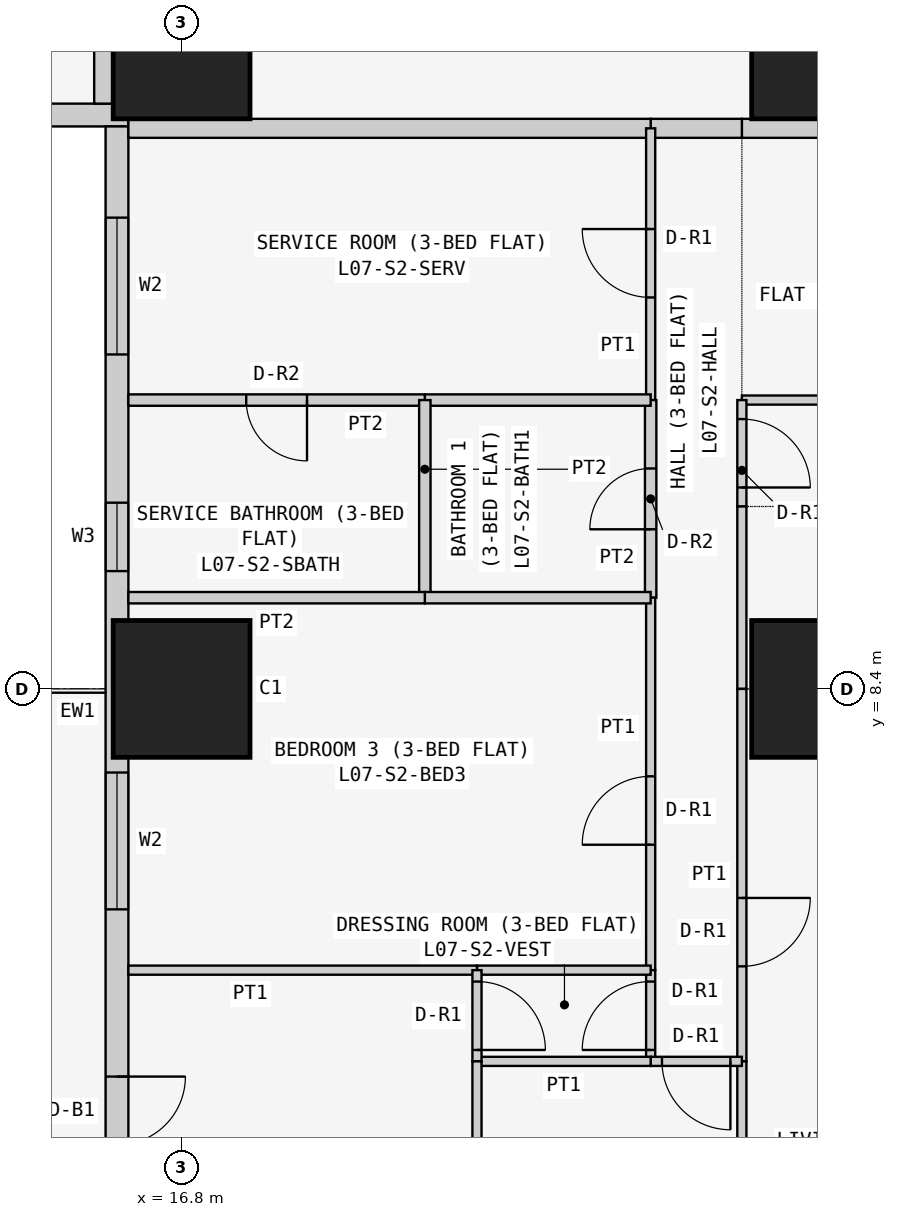
"""IFC4 building model, lengths in metres.
Left out: names, types, materials, properties, quantities, classifications, styles, units other than length and angle.
Written with IfcOpenShell. Run it as: python <this file> out.ifc"""

import sys

from ifc_helpers import new_model, si_unit, direction, frame, frame_2d, origin, origin_2d, place, context, subcontext, project, spatial, rectangle, extrude, element, fill, save


model = new_model("IFC4")
c1 = context("Model", 3, precision=1e-05, world=origin(), true_north=direction((0.0, 1.0)))
c2 = subcontext(c1, "Body", "Model", "MODEL_VIEW")
j1 = project(units=[si_unit("LENGTHUNIT", "METRE"), si_unit("PLANEANGLEUNIT", "RADIAN")], contexts=[c1])
p1 = place(None, origin())
s1 = spatial("IfcSite", under=j1, at=p1, CompositionType="ELEMENT")
p2 = place(p1, origin())
s2 = spatial("IfcBuilding", under=s1, at=p2, CompositionType="ELEMENT")
p3 = place(p2, frame((0.0, 0.0, 34.5)))
s3 = spatial("IfcBuildingStorey", under=s2, at=p3, CompositionType="ELEMENT", Elevation=34.5)
for number, where, z_axis, x_axis in (
    (1, (16.8, 8.4, 0.0), (0.0, 0.0, 1.0), (1.0, 0.0, 0.0)),
    (2, (16.8, 16.8, 0.0), (0.0, 0.0, 1.0), (1.0, 0.0, 0.0)),
    (3, (25.2, 8.4, 0.0), (0.0, 0.0, 1.0), (1.0, 0.0, 0.0)),
    (4, (25.2, 16.8, 0.0), (0.0, 0.0, 1.0), (1.0, 0.0, 0.0)),
):
    element("IfcColumn", number, at=place(p3, frame(where, z_axis=z_axis, x_axis=x_axis)), inside=s3, PredefinedType="COLUMN", context=c2, shape_type="SweptSolid", body=[
        extrude(rectangle(XDim=1.8, YDim=1.8, at=origin_2d()), origin(), (0.0, 0.0, 1.0), 3.6),
    ])
p4 = place(p3, frame((0.4, 15.95, 0.0), z_axis=(0.0, 0.0, 1.0), x_axis=(1.0, 0.0, 0.0)))
e5 = element("IfcWall", 5, at=p4, inside=s3, PredefinedType="SOLIDWALL", context=c2, shape_type="SweptSolid", body=[
    extrude(rectangle(XDim=15.7, YDim=0.3, at=frame_2d((7.85, 0.0))), origin(), (0.0, 0.0, 1.0), 3.45),
])
p5 = place(p4, frame((12.4, 0.0, 0.9)))
e6 = element("IfcOpeningElement", 6, at=p5, cuts=e5, PredefinedType="OPENING", context=c2, shape_type="SweptSolid", body=[
    extrude(rectangle(XDim=1.8, YDim=1.5, at=frame_2d((0.9, 0.75))), frame((0.0, 0.16, 0.0), z_axis=(0.0, -1.0, 0.0), x_axis=(1.0, 0.0, 0.0)), (0.0, 0.0, 1.0), 0.32),
])
p6 = place(p4, frame((9.55, 0.0, 1.5)))
e7 = element("IfcOpeningElement", 7, at=p6, cuts=e5, PredefinedType="OPENING", context=c2, shape_type="SweptSolid", body=[
    extrude(rectangle(XDim=0.9, YDim=0.7, at=frame_2d((0.45, 0.35))), frame((0.0, 0.16, 0.0), z_axis=(0.0, -1.0, 0.0), x_axis=(1.0, 0.0, 0.0)), (0.0, 0.0, 1.0), 0.32),
])
p7 = place(p4, frame((5.1, 0.0, 0.9)))
e8 = element("IfcOpeningElement", 8, at=p7, cuts=e5, PredefinedType="OPENING", context=c2, shape_type="SweptSolid", body=[
    extrude(rectangle(XDim=1.8, YDim=1.5, at=frame_2d((0.9, 0.75))), frame((0.0, 0.16, 0.0), z_axis=(0.0, -1.0, 0.0), x_axis=(1.0, 0.0, 0.0)), (0.0, 0.0, 1.0), 0.32),
])
p8 = place(p4, frame((2.0, 0.0, 0.0)))
e9 = element("IfcOpeningElement", 9, at=p8, cuts=e5, PredefinedType="OPENING", context=c2, shape_type="SweptSolid", body=[
    extrude(rectangle(XDim=0.9, YDim=2.4, at=frame_2d((0.45, 1.2))), frame((0.0, 0.16, 0.0), z_axis=(0.0, -1.0, 0.0), x_axis=(1.0, 0.0, 0.0)), (0.0, 0.0, 1.0), 0.32),
])
p9 = place(p4, frame((0.7, 0.0, 0.9)))
e10 = element("IfcOpeningElement", 10, at=p9, cuts=e5, PredefinedType="OPENING", context=c2, shape_type="SweptSolid", body=[
    extrude(rectangle(XDim=1.2, YDim=1.5, at=frame_2d((0.6, 0.75))), frame((0.0, 0.16, 0.0), z_axis=(0.0, -1.0, 0.0), x_axis=(1.0, 0.0, 0.0)), (0.0, 0.0, 1.0), 0.32),
])
p10 = place(p3, frame((15.95, 15.8, 0.0), z_axis=(0.0, 0.0, 1.0), x_axis=(0.0, -1.0, 0.0)))
e11 = element("IfcWall", 11, at=p10, inside=s3, PredefinedType="SOLIDWALL", context=c2, shape_type="SweptSolid", body=[
    extrude(rectangle(XDim=15.4, YDim=0.3, at=frame_2d((7.7, 0.0))), origin(), (0.0, 0.0, 1.0), 3.45),
])
p11 = place(p10, frame((1.2, 0.0, 0.9)))
e12 = element("IfcOpeningElement", 12, at=p11, cuts=e11, PredefinedType="OPENING", context=c2, shape_type="SweptSolid", body=[
    extrude(rectangle(XDim=1.8, YDim=1.5, at=frame_2d((0.9, 0.75))), frame((0.0, 0.16, 0.0), z_axis=(0.0, -1.0, 0.0), x_axis=(1.0, 0.0, 0.0)), (0.0, 0.0, 1.0), 0.32),
])
p12 = place(p10, frame((4.95, 0.0, 1.5)))
e13 = element("IfcOpeningElement", 13, at=p12, cuts=e11, PredefinedType="OPENING", context=c2, shape_type="SweptSolid", body=[
    extrude(rectangle(XDim=0.9, YDim=0.7, at=frame_2d((0.45, 0.35))), frame((0.0, 0.16, 0.0), z_axis=(0.0, -1.0, 0.0), x_axis=(1.0, 0.0, 0.0)), (0.0, 0.0, 1.0), 0.32),
])
p13 = place(p10, frame((8.5, 0.0, 0.9)))
e14 = element("IfcOpeningElement", 14, at=p13, cuts=e11, PredefinedType="OPENING", context=c2, shape_type="SweptSolid", body=[
    extrude(rectangle(XDim=1.8, YDim=1.5, at=frame_2d((0.9, 0.75))), frame((0.0, 0.16, 0.0), z_axis=(0.0, -1.0, 0.0), x_axis=(1.0, 0.0, 0.0)), (0.0, 0.0, 1.0), 0.32),
])
p14 = place(p10, frame((12.5, 0.0, 0.0)))
e15 = element("IfcOpeningElement", 15, at=p14, cuts=e11, PredefinedType="OPENING", context=c2, shape_type="SweptSolid", body=[
    extrude(rectangle(XDim=0.9, YDim=2.4, at=frame_2d((0.45, 1.2))), frame((0.0, 0.16, 0.0), z_axis=(0.0, -1.0, 0.0), x_axis=(1.0, 0.0, 0.0)), (0.0, 0.0, 1.0), 0.32),
])
p15 = place(p10, frame((13.5, 0.0, 0.9)))
e16 = element("IfcOpeningElement", 16, at=p15, cuts=e11, PredefinedType="OPENING", context=c2, shape_type="SweptSolid", body=[
    extrude(rectangle(XDim=1.2, YDim=1.5, at=frame_2d((0.6, 0.75))), frame((0.0, 0.16, 0.0), z_axis=(0.0, -1.0, 0.0), x_axis=(1.0, 0.0, 0.0)), (0.0, 0.0, 1.0), 0.32),
])
p16 = place(p3, frame((29.4, 15.775, 0.0), z_axis=(0.0, 0.0, 1.0), x_axis=(-1.0, 0.0, 0.0)))
e17 = element("IfcWall", 17, at=p16, inside=s3, PredefinedType="PARTITIONING", context=c2, shape_type="SweptSolid", body=[
    extrude(rectangle(XDim=5.229, YDim=0.25, at=frame_2d((2.615, 0.0))), origin(), (0.0, 0.0, 1.0), 3.45),
])
p17 = place(p16, frame((2.1, 0.0, 0.0)))
e18 = element("IfcOpeningElement", 18, at=p17, cuts=e17, PredefinedType="OPENING", context=c2, shape_type="SweptSolid", body=[
    extrude(rectangle(XDim=1.0, YDim=2.1, at=frame_2d((0.5, 1.05))), frame((0.0, 0.135, 0.0), z_axis=(0.0, -1.0, 0.0), x_axis=(1.0, 0.0, 0.0)), (0.0, 0.0, 1.0), 0.27),
])
p18 = place(p3, frame((24.171, 15.775, 0.0), z_axis=(0.0, 0.0, 1.0), x_axis=(-1.0, 0.0, 0.0)))
e19 = element("IfcWall", 19, at=p18, inside=s3, PredefinedType="PARTITIONING", context=c2, shape_type="SweptSolid", body=[
    extrude(rectangle(XDim=1.2, YDim=0.25, at=frame_2d((0.6, 0.0))), origin(), (0.0, 0.0, 1.0), 3.45),
])
for number, where, z_axis, x_axis in (
    (20, (22.971, 15.775, 0.0), (0.0, 0.0, 1.0), (-1.0, 0.0, 0.0)),
    (21, (15.775, 16.1, 0.0), (0.0, 0.0, 1.0), (0.0, 1.0, 0.0)),
):
    element("IfcWall", number, at=place(p3, frame(where, z_axis=z_axis, x_axis=x_axis)), inside=s3, PredefinedType="PARTITIONING", context=c2, shape_type="SweptSolid", body=[
        extrude(rectangle(XDim=6.871, YDim=0.25, at=frame_2d((3.436, 0.0))), origin(), (0.0, 0.0, 1.0), 3.45),
    ])
p19 = place(p3, frame((29.4, 12.2, 0.0), z_axis=(0.0, 0.0, 1.0), x_axis=(-1.0, 0.0, 0.0)))
e22 = element("IfcWall", 22, at=p19, inside=s3, PredefinedType="PARTITIONING", context=c2, shape_type="SweptSolid", body=[
    extrude(rectangle(XDim=5.229, YDim=0.12, at=frame_2d((2.615, 0.0))), origin(), (0.0, 0.0, 1.0), 3.45),
])
p20 = place(p3, frame((24.171, 10.8, 0.0), z_axis=(0.0, 0.0, 1.0), x_axis=(0.0, 1.0, 0.0)))
e23 = element("IfcWall", 23, at=p20, inside=s3, PredefinedType="PARTITIONING", context=c2, shape_type="SweptSolid", body=[
    extrude(rectangle(XDim=1.4, YDim=0.12, at=frame_2d((0.7, 0.0))), origin(), (0.0, 0.0, 1.0), 3.45),
])
p21 = place(p20, frame((0.25, 0.0, 0.0)))
e24 = element("IfcOpeningElement", 24, at=p21, cuts=e23, PredefinedType="OPENING", context=c2, shape_type="SweptSolid", body=[
    extrude(rectangle(XDim=0.9, YDim=2.1, at=frame_2d((0.45, 1.05))), frame((0.0, 0.07, 0.0), z_axis=(0.0, -1.0, 0.0), x_axis=(1.0, 0.0, 0.0)), (0.0, 0.0, 1.0), 0.14),
])
p22 = place(p3, frame((24.171, 8.4, 0.0), z_axis=(0.0, 0.0, 1.0), x_axis=(0.0, 1.0, 0.0)))
e25 = element("IfcWall", 25, at=p22, inside=s3, PredefinedType="PARTITIONING", context=c2, shape_type="SweptSolid", body=[
    extrude(rectangle(XDim=2.4, YDim=0.12, at=frame_2d((1.2, 0.0))), origin(), (0.0, 0.0, 1.0), 3.45),
])
p23 = place(p3, frame((24.171, 3.5, 0.0), z_axis=(0.0, 0.0, 1.0), x_axis=(0.0, 1.0, 0.0)))
e26 = element("IfcWall", 26, at=p23, inside=s3, PredefinedType="PARTITIONING", context=c2, shape_type="SweptSolid", body=[
    extrude(rectangle(XDim=4.9, YDim=0.12, at=frame_2d((2.45, 0.0))), origin(), (0.0, 0.0, 1.0), 3.45),
])
p24 = place(p23, frame((1.25, 0.0, 0.0)))
e27 = element("IfcOpeningElement", 27, at=p24, cuts=e26, PredefinedType="OPENING", context=c2, shape_type="SweptSolid", body=[
    extrude(rectangle(XDim=0.9, YDim=2.1, at=frame_2d((0.45, 1.05))), frame((0.0, 0.07, 0.0), z_axis=(0.0, -1.0, 0.0), x_axis=(1.0, 0.0, 0.0)), (0.0, 0.0, 1.0), 0.14),
])
p25 = place(p3, frame((24.171, -0.65, 0.0), z_axis=(0.0, 0.0, 1.0), x_axis=(0.0, 1.0, 0.0)))
e28 = element("IfcWall", 28, at=p25, inside=s3, PredefinedType="PARTITIONING", context=c2, shape_type="SweptSolid", body=[
    extrude(rectangle(XDim=4.15, YDim=0.12, at=frame_2d((2.075, 0.0))), origin(), (0.0, 0.0, 1.0), 3.45),
])
p26 = place(p3, frame((22.971, 12.2, 0.0), z_axis=(0.0, 0.0, 1.0), x_axis=(0.0, 1.0, 0.0)))
e29 = element("IfcWall", 29, at=p26, inside=s3, PredefinedType="PARTITIONING", context=c2, shape_type="SweptSolid", body=[
    extrude(rectangle(XDim=3.575, YDim=0.12, at=frame_2d((1.788, 0.0))), origin(), (0.0, 0.0, 1.0), 3.45),
])
p27 = place(p26, frame((1.35, 0.0, 0.0)))
e30 = element("IfcOpeningElement", 30, at=p27, cuts=e29, PredefinedType="OPENING", context=c2, shape_type="SweptSolid", body=[
    extrude(rectangle(XDim=0.9, YDim=2.1, at=frame_2d((0.45, 1.05))), frame((0.0, 0.07, 0.0), z_axis=(0.0, -1.0, 0.0), x_axis=(1.0, 0.0, 0.0)), (0.0, 0.0, 1.0), 0.14),
])
p28 = place(p3, frame((22.971, 9.6, 0.0), z_axis=(0.0, 0.0, 1.0), x_axis=(0.0, 1.0, 0.0)))
e31 = element("IfcWall", 31, at=p28, inside=s3, PredefinedType="PARTITIONING", context=c2, shape_type="SweptSolid", body=[
    extrude(rectangle(XDim=2.6, YDim=0.15, at=frame_2d((1.3, 0.0))), origin(), (0.0, 0.0, 1.0), 3.45),
])
p29 = place(p28, frame((0.9, 0.0, 0.0)))
e32 = element("IfcOpeningElement", 32, at=p29, cuts=e31, PredefinedType="OPENING", context=c2, shape_type="SweptSolid", body=[
    extrude(rectangle(XDim=0.8, YDim=2.1, at=frame_2d((0.4, 1.05))), frame((0.0, 0.085, 0.0), z_axis=(0.0, -1.0, 0.0), x_axis=(1.0, 0.0, 0.0)), (0.0, 0.0, 1.0), 0.17),
])
p30 = place(p3, frame((22.971, 4.7, 0.0), z_axis=(0.0, 0.0, 1.0), x_axis=(0.0, 1.0, 0.0)))
e33 = element("IfcWall", 33, at=p30, inside=s3, PredefinedType="PARTITIONING", context=c2, shape_type="SweptSolid", body=[
    extrude(rectangle(XDim=4.9, YDim=0.12, at=frame_2d((2.45, 0.0))), origin(), (0.0, 0.0, 1.0), 3.45),
])
p31 = place(p30, frame((1.65, 0.0, 0.0)))
e34 = element("IfcOpeningElement", 34, at=p31, cuts=e33, PredefinedType="OPENING", context=c2, shape_type="SweptSolid", body=[
    extrude(rectangle(XDim=0.9, YDim=2.1, at=frame_2d((0.45, 1.05))), frame((0.0, 0.07, 0.0), z_axis=(0.0, -1.0, 0.0), x_axis=(1.0, 0.0, 0.0)), (0.0, 0.0, 1.0), 0.14),
])
p32 = place(p3, frame((22.971, 3.5, 0.0), z_axis=(0.0, 0.0, 1.0), x_axis=(0.0, 1.0, 0.0)))
e35 = element("IfcWall", 35, at=p32, inside=s3, PredefinedType="PARTITIONING", context=c2, shape_type="SweptSolid", body=[
    extrude(rectangle(XDim=1.2, YDim=0.12, at=frame_2d((0.6, 0.0))), origin(), (0.0, 0.0, 1.0), 3.45),
])
p33 = place(p32, frame((0.15, 0.0, 0.0)))
e36 = element("IfcOpeningElement", 36, at=p33, cuts=e35, PredefinedType="OPENING", context=c2, shape_type="SweptSolid", body=[
    extrude(rectangle(XDim=0.9, YDim=2.1, at=frame_2d((0.45, 1.05))), frame((0.0, 0.07, 0.0), z_axis=(0.0, -1.0, 0.0), x_axis=(1.0, 0.0, 0.0)), (0.0, 0.0, 1.0), 0.14),
])
p34 = place(p3, frame((24.171, 3.5, 0.0), z_axis=(0.0, 0.0, 1.0), x_axis=(-1.0, 0.0, 0.0)))
e37 = element("IfcWall", 37, at=p34, inside=s3, PredefinedType="PARTITIONING", context=c2, shape_type="SweptSolid", body=[
    extrude(rectangle(XDim=1.2, YDim=0.12, at=frame_2d((0.6, 0.0))), origin(), (0.0, 0.0, 1.0), 3.45),
])
p35 = place(p34, frame((0.151, 0.0, 0.0)))
e38 = element("IfcOpeningElement", 38, at=p35, cuts=e37, PredefinedType="OPENING", context=c2, shape_type="SweptSolid", body=[
    extrude(rectangle(XDim=0.9, YDim=2.1, at=frame_2d((0.45, 1.05))), frame((0.0, 0.07, 0.0), z_axis=(0.0, -1.0, 0.0), x_axis=(1.0, 0.0, 0.0)), (0.0, 0.0, 1.0), 0.14),
])
p36 = place(p3, frame((22.971, 12.2, 0.0), z_axis=(0.0, 0.0, 1.0), x_axis=(-1.0, 0.0, 0.0)))
e39 = element("IfcWall", 39, at=p36, inside=s3, PredefinedType="PARTITIONING", context=c2, shape_type="SweptSolid", body=[
    extrude(rectangle(XDim=2.971, YDim=0.15, at=frame_2d((1.485, 0.0))), origin(), (0.0, 0.0, 1.0), 3.45),
])
p37 = place(p3, frame((20.0, 12.2, 0.0), z_axis=(0.0, 0.0, 1.0), x_axis=(-1.0, 0.0, 0.0)))
e40 = element("IfcWall", 40, at=p37, inside=s3, PredefinedType="PARTITIONING", context=c2, shape_type="SweptSolid", body=[
    extrude(rectangle(XDim=3.9, YDim=0.15, at=frame_2d((1.95, 0.0))), origin(), (0.0, 0.0, 1.0), 3.45),
])
p38 = place(p37, frame((1.55, 0.0, 0.0)))
e41 = element("IfcOpeningElement", 41, at=p38, cuts=e40, PredefinedType="OPENING", context=c2, shape_type="SweptSolid", body=[
    extrude(rectangle(XDim=0.8, YDim=2.1, at=frame_2d((0.4, 1.05))), frame((0.0, 0.085, 0.0), z_axis=(0.0, -1.0, 0.0), x_axis=(1.0, 0.0, 0.0)), (0.0, 0.0, 1.0), 0.17),
])
p39 = place(p3, frame((20.0, 9.6, 0.0), z_axis=(0.0, 0.0, 1.0), x_axis=(0.0, 1.0, 0.0)))
e42 = element("IfcWall", 42, at=p39, inside=s3, PredefinedType="PARTITIONING", context=c2, shape_type="SweptSolid", body=[
    extrude(rectangle(XDim=2.6, YDim=0.15, at=frame_2d((1.3, 0.0))), origin(), (0.0, 0.0, 1.0), 3.45),
])
p40 = place(p3, frame((22.971, 9.6, 0.0), z_axis=(0.0, 0.0, 1.0), x_axis=(-1.0, 0.0, 0.0)))
e43 = element("IfcWall", 43, at=p40, inside=s3, PredefinedType="PARTITIONING", context=c2, shape_type="SweptSolid", body=[
    extrude(rectangle(XDim=2.971, YDim=0.15, at=frame_2d((1.485, 0.0))), origin(), (0.0, 0.0, 1.0), 3.45),
])
p41 = place(p3, frame((20.0, 9.6, 0.0), z_axis=(0.0, 0.0, 1.0), x_axis=(-1.0, 0.0, 0.0)))
e44 = element("IfcWall", 44, at=p41, inside=s3, PredefinedType="PARTITIONING", context=c2, shape_type="SweptSolid", body=[
    extrude(rectangle(XDim=3.9, YDim=0.15, at=frame_2d((1.95, 0.0))), origin(), (0.0, 0.0, 1.0), 3.45),
])
p42 = place(p3, frame((22.971, 4.7, 0.0), z_axis=(0.0, 0.0, 1.0), x_axis=(-1.0, 0.0, 0.0)))
e45 = element("IfcWall", 45, at=p42, inside=s3, PredefinedType="PARTITIONING", context=c2, shape_type="SweptSolid", body=[
    extrude(rectangle(XDim=2.285, YDim=0.12, at=frame_2d((1.143, 0.0))), origin(), (0.0, 0.0, 1.0), 3.45),
])
p43 = place(p3, frame((20.686, 4.7, 0.0), z_axis=(0.0, 0.0, 1.0), x_axis=(-1.0, 0.0, 0.0)))
e46 = element("IfcWall", 46, at=p43, inside=s3, PredefinedType="PARTITIONING", context=c2, shape_type="SweptSolid", body=[
    extrude(rectangle(XDim=4.586, YDim=0.12, at=frame_2d((2.293, 0.0))), origin(), (0.0, 0.0, 1.0), 3.45),
])
p44 = place(p3, frame((22.971, 3.5, 0.0), z_axis=(0.0, 0.0, 1.0), x_axis=(-1.0, 0.0, 0.0)))
e47 = element("IfcWall", 47, at=p44, inside=s3, PredefinedType="PARTITIONING", context=c2, shape_type="SweptSolid", body=[
    extrude(rectangle(XDim=2.285, YDim=0.12, at=frame_2d((1.143, 0.0))), origin(), (0.0, 0.0, 1.0), 3.45),
])
p45 = place(p3, frame((20.686, 3.5, 0.0), z_axis=(0.0, 0.0, 1.0), x_axis=(0.0, 1.0, 0.0)))
e48 = element("IfcWall", 48, at=p45, inside=s3, PredefinedType="PARTITIONING", context=c2, shape_type="SweptSolid", body=[
    extrude(rectangle(XDim=1.2, YDim=0.12, at=frame_2d((0.6, 0.0))), origin(), (0.0, 0.0, 1.0), 3.45),
])
p46 = place(p45, frame((0.15, 0.0, 0.0)))
e49 = element("IfcOpeningElement", 49, at=p46, cuts=e48, PredefinedType="OPENING", context=c2, shape_type="SweptSolid", body=[
    extrude(rectangle(XDim=0.9, YDim=2.1, at=frame_2d((0.45, 1.05))), frame((0.0, 0.07, 0.0), z_axis=(0.0, -1.0, 0.0), x_axis=(1.0, 0.0, 0.0)), (0.0, 0.0, 1.0), 0.14),
])
p47 = place(p3, frame((20.686, -0.65, 0.0), z_axis=(0.0, 0.0, 1.0), x_axis=(0.0, 1.0, 0.0)))
e50 = element("IfcWall", 50, at=p47, inside=s3, PredefinedType="PARTITIONING", context=c2, shape_type="SweptSolid", body=[
    extrude(rectangle(XDim=4.15, YDim=0.12, at=frame_2d((2.075, 0.0))), origin(), (0.0, 0.0, 1.0), 3.45),
])
p48 = place(p11, origin())
e51 = element("IfcWindow", 51, at=p48, inside=s3, PartitioningType="SINGLE_PANEL", PredefinedType="WINDOW", context=c2, shape_type="SweptSolid", body=[
    extrude(rectangle(XDim=1.8, YDim=1.5, at=frame_2d((0.9, 0.75))), frame((0.0, 0.03, 0.0), z_axis=(0.0, -1.0, 0.0), x_axis=(1.0, 0.0, 0.0)), (0.0, 0.0, 1.0), 0.06),
])
fill(e12, e51)
p49 = place(p12, origin())
e52 = element("IfcWindow", 52, at=p49, inside=s3, PartitioningType="SINGLE_PANEL", PredefinedType="WINDOW", context=c2, shape_type="SweptSolid", body=[
    extrude(rectangle(XDim=0.9, YDim=0.7, at=frame_2d((0.45, 0.35))), frame((0.0, 0.03, 0.0), z_axis=(0.0, -1.0, 0.0), x_axis=(1.0, 0.0, 0.0)), (0.0, 0.0, 1.0), 0.06),
])
fill(e13, e52)
p50 = place(p13, origin())
e53 = element("IfcWindow", 53, at=p50, inside=s3, PartitioningType="SINGLE_PANEL", PredefinedType="WINDOW", context=c2, shape_type="SweptSolid", body=[
    extrude(rectangle(XDim=1.8, YDim=1.5, at=frame_2d((0.9, 0.75))), frame((0.0, 0.03, 0.0), z_axis=(0.0, -1.0, 0.0), x_axis=(1.0, 0.0, 0.0)), (0.0, 0.0, 1.0), 0.06),
])
fill(e14, e53)
p51 = place(p14, origin())
e54 = element("IfcDoor", 54, at=p51, inside=s3, OperationType="SINGLE_SWING_LEFT", PredefinedType="DOOR", context=c2, shape_type="SweptSolid", body=[
    extrude(rectangle(XDim=0.9, YDim=2.4, at=frame_2d((0.45, 1.2))), frame((0.0, 0.025, 0.0), z_axis=(0.0, -1.0, 0.0), x_axis=(1.0, 0.0, 0.0)), (0.0, 0.0, 1.0), 0.05),
])
fill(e15, e54)
p52 = place(p21, frame((0.9, 0.0, 0.0), z_axis=(0.0, 0.0, 1.0), x_axis=(-1.0, 0.0, 0.0)))
e55 = element("IfcDoor", 55, at=p52, inside=s3, OperationType="SINGLE_SWING_RIGHT", PredefinedType="DOOR", context=c2, shape_type="SweptSolid", body=[
    extrude(rectangle(XDim=0.9, YDim=2.1, at=frame_2d((0.45, 1.05))), frame((0.0, 0.025, 0.0), z_axis=(0.0, -1.0, 0.0), x_axis=(1.0, 0.0, 0.0)), (0.0, 0.0, 1.0), 0.05),
])
fill(e24, e55)
p53 = place(p24, frame((0.9, 0.0, 0.0), z_axis=(0.0, 0.0, 1.0), x_axis=(-1.0, 0.0, 0.0)))
e56 = element("IfcDoor", 56, at=p53, inside=s3, OperationType="SINGLE_SWING_LEFT", PredefinedType="DOOR", context=c2, shape_type="SweptSolid", body=[
    extrude(rectangle(XDim=0.9, YDim=2.1, at=frame_2d((0.45, 1.05))), frame((0.0, 0.025, 0.0), z_axis=(0.0, -1.0, 0.0), x_axis=(1.0, 0.0, 0.0)), (0.0, 0.0, 1.0), 0.05),
])
fill(e27, e56)
p54 = place(p27, origin())
e57 = element("IfcDoor", 57, at=p54, inside=s3, OperationType="SINGLE_SWING_RIGHT", PredefinedType="DOOR", context=c2, shape_type="SweptSolid", body=[
    extrude(rectangle(XDim=0.9, YDim=2.1, at=frame_2d((0.45, 1.05))), frame((0.0, 0.025, 0.0), z_axis=(0.0, -1.0, 0.0), x_axis=(1.0, 0.0, 0.0)), (0.0, 0.0, 1.0), 0.05),
])
fill(e30, e57)
p55 = place(p38, origin())
e58 = element("IfcDoor", 58, at=p55, inside=s3, OperationType="SINGLE_SWING_LEFT", PredefinedType="DOOR", context=c2, shape_type="SweptSolid", body=[
    extrude(rectangle(XDim=0.8, YDim=2.1, at=frame_2d((0.4, 1.05))), frame((0.0, 0.025, 0.0), z_axis=(0.0, -1.0, 0.0), x_axis=(1.0, 0.0, 0.0)), (0.0, 0.0, 1.0), 0.05),
])
fill(e41, e58)
p56 = place(p29, origin())
e59 = element("IfcDoor", 59, at=p56, inside=s3, OperationType="SINGLE_SWING_LEFT", PredefinedType="DOOR", context=c2, shape_type="SweptSolid", body=[
    extrude(rectangle(XDim=0.8, YDim=2.1, at=frame_2d((0.4, 1.05))), frame((0.0, 0.025, 0.0), z_axis=(0.0, -1.0, 0.0), x_axis=(1.0, 0.0, 0.0)), (0.0, 0.0, 1.0), 0.05),
])
fill(e32, e59)
p57 = place(p31, origin())
e60 = element("IfcDoor", 60, at=p57, inside=s3, OperationType="SINGLE_SWING_LEFT", PredefinedType="DOOR", context=c2, shape_type="SweptSolid", body=[
    extrude(rectangle(XDim=0.9, YDim=2.1, at=frame_2d((0.45, 1.05))), frame((0.0, 0.025, 0.0), z_axis=(0.0, -1.0, 0.0), x_axis=(1.0, 0.0, 0.0)), (0.0, 0.0, 1.0), 0.05),
])
fill(e34, e60)
p58 = place(p33, origin())
e61 = element("IfcDoor", 61, at=p58, inside=s3, OperationType="SINGLE_SWING_LEFT", PredefinedType="DOOR", context=c2, shape_type="SweptSolid", body=[
    extrude(rectangle(XDim=0.9, YDim=2.1, at=frame_2d((0.45, 1.05))), frame((0.0, 0.025, 0.0), z_axis=(0.0, -1.0, 0.0), x_axis=(1.0, 0.0, 0.0)), (0.0, 0.0, 1.0), 0.05),
])
fill(e36, e61)
p59 = place(p46, frame((0.9, 0.0, 0.0), z_axis=(0.0, 0.0, 1.0), x_axis=(-1.0, 0.0, 0.0)))
e62 = element("IfcDoor", 62, at=p59, inside=s3, OperationType="SINGLE_SWING_RIGHT", PredefinedType="DOOR", context=c2, shape_type="SweptSolid", body=[
    extrude(rectangle(XDim=0.9, YDim=2.1, at=frame_2d((0.45, 1.05))), frame((0.0, 0.025, 0.0), z_axis=(0.0, -1.0, 0.0), x_axis=(1.0, 0.0, 0.0)), (0.0, 0.0, 1.0), 0.05),
])
fill(e49, e62)
p60 = place(p35, origin())
e63 = element("IfcDoor", 63, at=p60, inside=s3, OperationType="SINGLE_SWING_LEFT", PredefinedType="DOOR", context=c2, shape_type="SweptSolid", body=[
    extrude(rectangle(XDim=0.9, YDim=2.1, at=frame_2d((0.45, 1.05))), frame((0.0, 0.025, 0.0), z_axis=(0.0, -1.0, 0.0), x_axis=(1.0, 0.0, 0.0)), (0.0, 0.0, 1.0), 0.05),
])
fill(e38, e63)
save(model, sys.argv[1])
